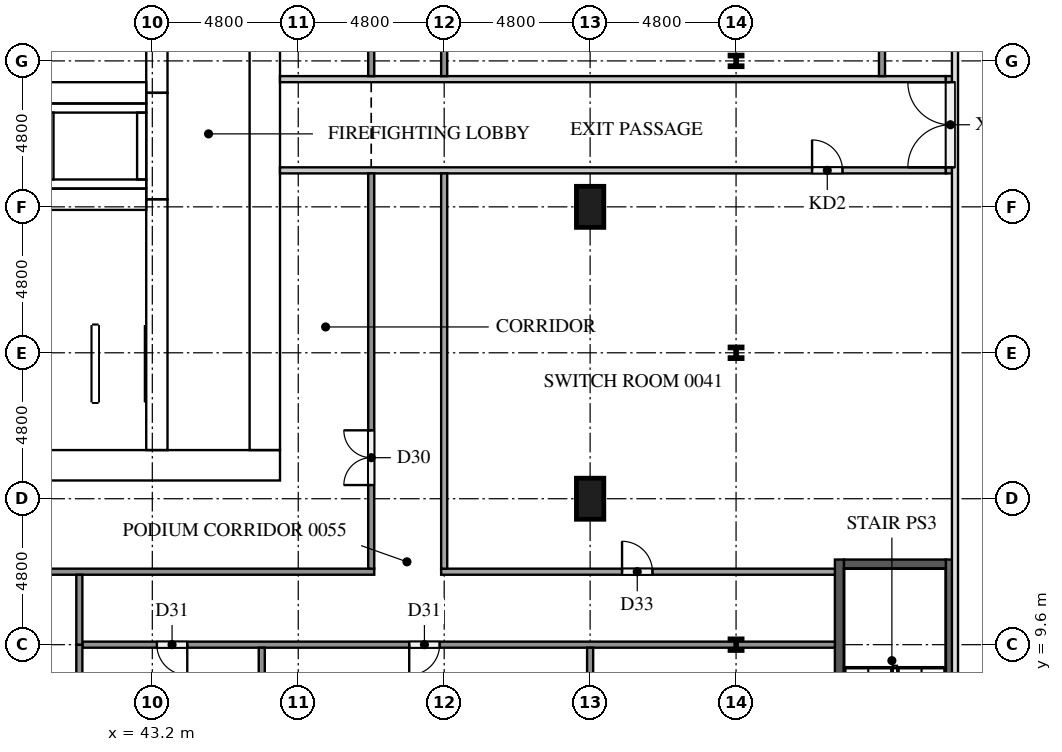
"""IFC4 building model, lengths in metres.
Left out: names, types, materials, properties, quantities, classifications, styles, units other than length and angle.
Written with IfcOpenShell. Run it as: python <this file> out.ifc"""

import sys

from ifc_helpers import new_model, si_unit, direction, frame, frame_2d, origin, origin_2d, place, context, subcontext, project, spatial, rectangle, i_section, extrude, element, fill, save


model = new_model("IFC4")
c1 = context("Model", 3, precision=1e-05, world=origin(), true_north=direction((0.0, 1.0)))
c2 = subcontext(c1, "Body", "Model", "MODEL_VIEW")
j1 = project(units=[si_unit("LENGTHUNIT", "METRE"), si_unit("PLANEANGLEUNIT", "RADIAN")], contexts=[c1])
p1 = place(None, origin())
s1 = spatial("IfcSite", under=j1, at=p1, CompositionType="ELEMENT")
p2 = place(p1, origin())
s2 = spatial("IfcBuilding", under=s1, at=p2, CompositionType="ELEMENT")
p3 = place(p2, origin())
s3 = spatial("IfcBuildingStorey", under=s2, at=p3, CompositionType="ELEMENT", Elevation=0.0)
p4 = place(p3, frame((65.8, 4.4, 0.0), z_axis=(0.0, 0.0, 1.0), x_axis=(0.0, 1.0, 0.0)))
e1 = element("IfcWall", 1, at=p4, inside=s3, PredefinedType="SOLIDWALL", context=c2, shape_type="SweptSolid", body=[
    extrude(rectangle(XDim=8.0, YDim=0.3, at=frame_2d((4.0, 0.0))), origin(), (0.0, 0.0, 1.0), 5.7),
])
p5 = place(p3, frame((69.45, 4.4, 0.0), z_axis=(0.0, 0.0, 1.0), x_axis=(0.0, 1.0, 0.0)))
e2 = element("IfcWall", 2, at=p5, inside=s3, PredefinedType="SOLIDWALL", context=c2, shape_type="SweptSolid", body=[
    extrude(rectangle(XDim=8.0, YDim=0.3, at=frame_2d((4.0, 0.0))), origin(), (0.0, 0.0, 1.0), 5.7),
])
p6 = place(p5, frame((0.4, 0.0, 0.0)))
e3 = element("IfcOpeningElement", 3, at=p6, cuts=e2, PredefinedType="OPENING", context=c2, shape_type="SweptSolid", body=[
    extrude(rectangle(XDim=1.4, YDim=2.1, at=frame_2d((0.7, 1.05))), frame((0.0, 0.16, 0.0), z_axis=(0.0, -1.0, 0.0), x_axis=(1.0, 0.0, 0.0)), (0.0, 0.0, 1.0), 0.32),
])
p7 = place(p3, frame((65.95, 12.25, 0.0), z_axis=(0.0, 0.0, 1.0), x_axis=(1.0, 0.0, 0.0)))
e4 = element("IfcWall", 4, at=p7, inside=s3, PredefinedType="SOLIDWALL", context=c2, shape_type="SweptSolid", body=[
    extrude(rectangle(XDim=3.35, YDim=0.3, at=frame_2d((1.675, 0.0))), origin(), (0.0, 0.0, 1.0), 5.7),
])
p8 = place(p3, frame((15.0, 15.5, 0.0), z_axis=(0.0, 0.0, 1.0), x_axis=(1.0, 0.0, 0.0)))
e5 = element("IfcWall", 5, at=p8, inside=s3, PredefinedType="SHEAR", context=c2, shape_type="SweptSolid", body=[
    extrude(rectangle(XDim=32.4, YDim=1.0, at=frame_2d((16.2, 0.0))), origin(), (0.0, 0.0, 1.0), 5.7),
])
p9 = place(p8, frame((15.3, 0.0, 0.0)))
e6 = element("IfcOpeningElement", 6, at=p9, cuts=e5, PredefinedType="OPENING", context=c2, shape_type="SweptSolid", body=[
    extrude(rectangle(XDim=1.8, YDim=2.1, at=frame_2d((0.9, 1.05))), frame((0.0, 0.51, 0.0), z_axis=(0.0, -1.0, 0.0), x_axis=(1.0, 0.0, 0.0)), (0.0, 0.0, 1.0), 1.02),
])
p10 = place(p3, frame((46.9, 16.0, 0.0), z_axis=(0.0, 0.0, 1.0), x_axis=(0.0, 1.0, 0.0)))
e7 = element("IfcWall", 7, at=p10, inside=s3, PredefinedType="SHEAR", context=c2, shape_type="SweptSolid", body=[
    extrude(rectangle(XDim=20.8, YDim=1.0, at=frame_2d((10.4, 0.0))), origin(), (0.0, 0.0, 1.0), 5.7),
])
p11 = place(p10, frame((10.1, 0.0, 0.0)))
e8 = element("IfcOpeningElement", 8, at=p11, cuts=e7, PredefinedType="OPENING", context=c2, shape_type="SweptSolid", body=[
    extrude(rectangle(XDim=1.2, YDim=2.1, at=frame_2d((0.6, 1.05))), frame((0.0, 0.51, 0.0), z_axis=(0.0, -1.0, 0.0), x_axis=(1.0, 0.0, 0.0)), (0.0, 0.0, 1.0), 1.02),
])
p12 = place(p3, frame((43.35, 16.0, 0.0), z_axis=(0.0, 0.0, 1.0), x_axis=(0.0, 1.0, 0.0)))
e9 = element("IfcWall", 9, at=p12, inside=s3, PredefinedType="SHEAR", context=c2, shape_type="SweptSolid", body=[
    extrude(rectangle(XDim=8.25, YDim=0.7, at=frame_2d((4.125, 0.0))), origin(), (0.0, 0.0, 1.0), 5.7),
])
p13 = place(p12, frame((0.2, 0.0, 0.0)))
e10 = element("IfcOpeningElement", 10, at=p13, cuts=e9, PredefinedType="OPENING", context=c2, shape_type="SweptSolid", body=[
    extrude(rectangle(XDim=1.2, YDim=2.1, at=frame_2d((0.6, 1.05))), frame((0.0, 0.36, 0.0), z_axis=(0.0, -1.0, 0.0), x_axis=(1.0, 0.0, 0.0)), (0.0, 0.0, 1.0), 0.72),
])
p14 = place(p3, frame((43.35, 24.25, 0.0), z_axis=(0.0, 0.0, 1.0), x_axis=(0.0, 1.0, 0.0)))
e11 = element("IfcWall", 11, at=p14, inside=s3, PredefinedType="SHEAR", context=c2, shape_type="SweptSolid", body=[
    extrude(rectangle(XDim=3.5, YDim=0.7, at=frame_2d((1.75, 0.0))), origin(), (0.0, 0.0, 1.0), 5.7),
])
p15 = place(p14, frame((1.2, 0.0, 0.0)))
e12 = element("IfcOpeningElement", 12, at=p15, cuts=e11, PredefinedType="OPENING", context=c2, shape_type="SweptSolid", body=[
    extrude(rectangle(XDim=1.1, YDim=2.1, at=frame_2d((0.55, 1.05))), frame((0.0, 0.36, 0.0), z_axis=(0.0, -1.0, 0.0), x_axis=(1.0, 0.0, 0.0)), (0.0, 0.0, 1.0), 0.72),
])
p16 = place(p3, frame((43.35, 27.75, 0.0), z_axis=(0.0, 0.0, 1.0), x_axis=(0.0, 1.0, 0.0)))
e13 = element("IfcWall", 13, at=p16, inside=s3, PredefinedType="SHEAR", context=c2, shape_type="SweptSolid", body=[
    extrude(rectangle(XDim=9.05, YDim=0.7, at=frame_2d((4.525, 0.0))), origin(), (0.0, 0.0, 1.0), 5.7),
])
p17 = place(p16, frame((7.65, 0.0, 0.0)))
e14 = element("IfcOpeningElement", 14, at=p17, cuts=e13, PredefinedType="OPENING", context=c2, shape_type="SweptSolid", body=[
    extrude(rectangle(XDim=1.2, YDim=2.1, at=frame_2d((0.6, 1.05))), frame((0.0, 0.36, 0.0), z_axis=(0.0, -1.0, 0.0), x_axis=(1.0, 0.0, 0.0)), (0.0, 0.0, 1.0), 0.72),
])
for number, where, z_axis, x_axis in (
    (15, (39.65, 24.25, 0.0), (0.0, 0.0, 1.0), (1.0, 0.0, 0.0)),
    (16, (39.65, 27.75, 0.0), (0.0, 0.0, 1.0), (1.0, 0.0, 0.0)),
):
    element("IfcWall", number, at=place(p3, frame(where, z_axis=z_axis, x_axis=x_axis)), inside=s3, PredefinedType="SHEAR", context=c2, shape_type="SweptSolid", body=[
        extrude(rectangle(XDim=3.35, YDim=0.7, at=frame_2d((1.675, 0.0))), origin(), (0.0, 0.0, 1.0), 5.7),
    ])
for number, where, z_axis, x_axis in (
    (17, (39.65, 24.75, -1.8), (0.0, 0.0, 1.0), (1.0, 0.0, 0.0)),
    (18, (39.65, 27.25, -1.8), (0.0, 0.0, 1.0), (1.0, 0.0, 0.0)),
):
    element("IfcWall", number, at=place(p3, frame(where, z_axis=z_axis, x_axis=x_axis)), inside=s3, PredefinedType="SOLIDWALL", context=c2, shape_type="SweptSolid", body=[
        extrude(rectangle(XDim=3.35, YDim=0.3, at=frame_2d((1.675, 0.0))), origin(), (0.0, 0.0, 1.0), 1.8),
    ])
for number, where, z_axis, x_axis in (
    (19, (39.8, 24.9, -1.8), (0.0, 0.0, 1.0), (0.0, 1.0, 0.0)),
    (20, (42.85, 24.9, -1.8), (0.0, 0.0, 1.0), (0.0, 1.0, 0.0)),
):
    element("IfcWall", number, at=place(p3, frame(where, z_axis=z_axis, x_axis=x_axis)), inside=s3, PredefinedType="SOLIDWALL", context=c2, shape_type="SweptSolid", body=[
        extrude(rectangle(XDim=2.2, YDim=0.3, at=frame_2d((1.1, 0.0))), origin(), (0.0, 0.0, 1.0), 1.8),
    ])
for number, where, z_axis, x_axis in (
    (21, (57.6, 14.4, 0.0), (0.0, 0.0, 1.0), (0.0, 1.0, 0.0)),
    (22, (57.6, 24.0, 0.0), (0.0, 0.0, 1.0), (0.0, 1.0, 0.0)),
):
    element("IfcColumn", number, at=place(p3, frame(where, z_axis=z_axis, x_axis=x_axis)), inside=s3, PredefinedType="COLUMN", context=c2, shape_type="SweptSolid", body=[
        extrude(rectangle(XDim=1.35, YDim=0.9, at=origin_2d()), origin(), (0.0, 0.0, 1.0), 5.7),
    ])
for number, where, z_axis, x_axis in (
    (23, (62.4, 9.6, 0.0), (0.0, 0.0, 1.0), (1.0, 0.0, 0.0)),
    (24, (62.4, 19.2, 0.0), (0.0, 0.0, 1.0), (1.0, 0.0, 0.0)),
    (25, (62.4, 28.8, 0.0), (0.0, 0.0, 1.0), (1.0, 0.0, 0.0)),
):
    element("IfcColumn", number, at=place(p3, frame(where, z_axis=z_axis, x_axis=x_axis)), inside=s3, PredefinedType="COLUMN", context=c2, shape_type="SweptSolid", body=[
        extrude(i_section(OverallWidth=0.396, OverallDepth=0.381, WebThickness=0.019, FlangeThickness=0.03, at=origin_2d()), origin(), (0.0, 0.0, 1.0), 5.7),
    ])
p18 = place(p3, frame((47.4, 25.2, 0.0), z_axis=(0.0, 0.0, 1.0), x_axis=(1.0, 0.0, 0.0)))
e26 = element("IfcWall", 26, at=p18, inside=s3, PredefinedType="PARTITIONING", context=c2, shape_type="SweptSolid", body=[
    extrude(rectangle(XDim=21.9, YDim=0.2, at=frame_2d((10.95, 0.0))), origin(), (0.0, 0.0, 1.0), 5.7),
])
p19 = place(p18, frame((17.5, 0.0, 0.0)))
e27 = element("IfcOpeningElement", 27, at=p19, cuts=e26, PredefinedType="OPENING", context=c2, shape_type="SweptSolid", body=[
    extrude(rectangle(XDim=1.0, YDim=2.1, at=frame_2d((0.5, 1.05))), frame((0.0, 0.11, 0.0), z_axis=(0.0, -1.0, 0.0), x_axis=(1.0, 0.0, 0.0)), (0.0, 0.0, 1.0), 0.22),
])
p20 = place(p3, frame((47.4, 28.2, 0.0), z_axis=(0.0, 0.0, 1.0), x_axis=(1.0, 0.0, 0.0)))
e28 = element("IfcWall", 28, at=p20, inside=s3, PredefinedType="PARTITIONING", context=c2, shape_type="SweptSolid", body=[
    extrude(rectangle(XDim=21.9, YDim=0.2, at=frame_2d((10.95, 0.0))), origin(), (0.0, 0.0, 1.0), 5.7),
])
p21 = place(p3, frame((69.45, 25.1, 0.0), z_axis=(0.0, 0.0, 1.0), x_axis=(0.0, 1.0, 0.0)))
e29 = element("IfcWall", 29, at=p21, inside=s3, PredefinedType="SOLIDWALL", context=c2, shape_type="SweptSolid", body=[
    extrude(rectangle(XDim=3.2, YDim=0.3, at=frame_2d((1.6, 0.0))), origin(), (0.0, 0.0, 1.0), 5.7),
])
p22 = place(p21, frame((0.2, 0.0, 0.0)))
e30 = element("IfcOpeningElement", 30, at=p22, cuts=e29, PredefinedType="OPENING", context=c2, shape_type="SweptSolid", body=[
    extrude(rectangle(XDim=2.8, YDim=2.1, at=frame_2d((1.4, 1.05))), frame((0.0, 0.16, 0.0), z_axis=(0.0, -1.0, 0.0), x_axis=(1.0, 0.0, 0.0)), (0.0, 0.0, 1.0), 0.32),
])
p23 = place(p3, frame((65.65, 9.6, 0.0), z_axis=(0.0, 0.0, 1.0), x_axis=(-1.0, 0.0, 0.0)))
e31 = element("IfcWall", 31, at=p23, inside=s3, PredefinedType="PARTITIONING", context=c2, shape_type="SweptSolid", body=[
    extrude(rectangle(XDim=24.75, YDim=0.2, at=frame_2d((12.375, 0.0))), origin(), (0.0, 0.0, 1.0), 5.7),
])
p24 = place(p23, frame((21.3, 0.0, 0.0)))
e32 = element("IfcOpeningElement", 32, at=p24, cuts=e31, PredefinedType="OPENING", context=c2, shape_type="SweptSolid", body=[
    extrude(rectangle(XDim=1.0, YDim=2.1, at=frame_2d((0.5, 1.05))), frame((0.0, 0.11, 0.0), z_axis=(0.0, -1.0, 0.0), x_axis=(1.0, 0.0, 0.0)), (0.0, 0.0, 1.0), 0.22),
])
p25 = place(p23, frame((13.0, 0.0, 0.0)))
e33 = element("IfcOpeningElement", 33, at=p25, cuts=e31, PredefinedType="OPENING", context=c2, shape_type="SweptSolid", body=[
    extrude(rectangle(XDim=1.0, YDim=2.1, at=frame_2d((0.5, 1.05))), frame((0.0, 0.11, 0.0), z_axis=(0.0, -1.0, 0.0), x_axis=(1.0, 0.0, 0.0)), (0.0, 0.0, 1.0), 0.22),
])
p26 = place(p3, frame((11.9, 12.0, 0.0), z_axis=(0.0, 0.0, 1.0), x_axis=(1.0, 0.0, 0.0)))
e34 = element("IfcWall", 34, at=p26, inside=s3, PredefinedType="PARTITIONING", context=c2, shape_type="SweptSolid", body=[
    extrude(rectangle(XDim=38.6, YDim=0.2, at=frame_2d((19.3, 0.0))), origin(), (0.0, 0.0, 1.0), 5.7),
])
p27 = place(p26, frame((1.85, 0.0, 0.0)))
e35 = element("IfcOpeningElement", 35, at=p27, cuts=e34, PredefinedType="OPENING", context=c2, shape_type="SweptSolid", body=[
    extrude(rectangle(XDim=1.8, YDim=2.1, at=frame_2d((0.9, 1.05))), frame((0.0, 0.11, 0.0), z_axis=(0.0, -1.0, 0.0), x_axis=(1.0, 0.0, 0.0)), (0.0, 0.0, 1.0), 0.22),
])
p28 = place(p26, frame((23.25, 0.0, 0.0)))
e36 = element("IfcOpeningElement", 36, at=p28, cuts=e34, PredefinedType="OPENING", context=c2, shape_type="SweptSolid", body=[
    extrude(rectangle(XDim=1.8, YDim=2.1, at=frame_2d((0.9, 1.05))), frame((0.0, 0.11, 0.0), z_axis=(0.0, -1.0, 0.0), x_axis=(1.0, 0.0, 0.0)), (0.0, 0.0, 1.0), 0.22),
])
p29 = place(p26, frame((13.65, 0.0, 0.0)))
e37 = element("IfcOpeningElement", 37, at=p29, cuts=e34, PredefinedType="OPENING", context=c2, shape_type="SweptSolid", body=[
    extrude(rectangle(XDim=1.8, YDim=2.1, at=frame_2d((0.9, 1.05))), frame((0.0, 0.11, 0.0), z_axis=(0.0, -1.0, 0.0), x_axis=(1.0, 0.0, 0.0)), (0.0, 0.0, 1.0), 0.22),
])
p30 = place(p26, frame((4.05, 0.0, 0.0)))
e38 = element("IfcOpeningElement", 38, at=p30, cuts=e34, PredefinedType="OPENING", context=c2, shape_type="SweptSolid", body=[
    extrude(rectangle(XDim=1.8, YDim=2.1, at=frame_2d((0.9, 1.05))), frame((0.0, 0.11, 0.0), z_axis=(0.0, -1.0, 0.0), x_axis=(1.0, 0.0, 0.0)), (0.0, 0.0, 1.0), 0.22),
])
p31 = place(p3, frame((52.7, 12.0, 0.0), z_axis=(0.0, 0.0, 1.0), x_axis=(1.0, 0.0, 0.0)))
e39 = element("IfcWall", 39, at=p31, inside=s3, PredefinedType="PARTITIONING", context=c2, shape_type="SweptSolid", body=[
    extrude(rectangle(XDim=12.95, YDim=0.2, at=frame_2d((6.475, 0.0))), origin(), (0.0, 0.0, 1.0), 5.7),
])
p32 = place(p31, frame((5.95, 0.0, 0.0)))
e40 = element("IfcOpeningElement", 40, at=p32, cuts=e39, PredefinedType="OPENING", context=c2, shape_type="SweptSolid", body=[
    extrude(rectangle(XDim=1.0, YDim=2.1, at=frame_2d((0.5, 1.05))), frame((0.0, 0.11, 0.0), z_axis=(0.0, -1.0, 0.0), x_axis=(1.0, 0.0, 0.0)), (0.0, 0.0, 1.0), 0.22),
])
p33 = place(p3, frame((40.8, 0.0, 0.0), z_axis=(0.0, 0.0, 1.0), x_axis=(0.0, 1.0, 0.0)))
e41 = element("IfcWall", 41, at=p33, inside=s3, PredefinedType="PARTITIONING", context=c2, shape_type="SweptSolid", body=[
    extrude(rectangle(XDim=9.6, YDim=0.2, at=frame_2d((4.8, 0.0))), origin(), (0.0, 0.0, 1.0), 5.7),
])
p34 = place(p3, frame((40.8, 9.6, 0.0), z_axis=(0.0, 0.0, 1.0), x_axis=(0.0, 1.0, 0.0)))
e42 = element("IfcWall", 42, at=p34, inside=s3, PredefinedType="PARTITIONING", context=c2, shape_type="SweptSolid", body=[
    extrude(rectangle(XDim=2.3, YDim=0.2, at=frame_2d((1.15, 0.0))), origin(), (0.0, 0.0, 1.0), 5.7),
])
p35 = place(p3, frame((46.8, 0.1, 0.0), z_axis=(0.0, 0.0, 1.0), x_axis=(0.0, 1.0, 0.0)))
e43 = element("IfcWall", 43, at=p35, inside=s3, PredefinedType="PARTITIONING", context=c2, shape_type="SweptSolid", body=[
    extrude(rectangle(XDim=9.4, YDim=0.2, at=frame_2d((4.7, 0.0))), origin(), (0.0, 0.0, 1.0), 5.7),
])
p36 = place(p3, frame((50.4, 12.1, 0.0), z_axis=(0.0, 0.0, 1.0), x_axis=(0.0, 1.0, 0.0)))
e44 = element("IfcWall", 44, at=p36, inside=s3, PredefinedType="PARTITIONING", context=c2, shape_type="SweptSolid", body=[
    extrude(rectangle(XDim=13.0, YDim=0.2, at=frame_2d((6.5, 0.0))), origin(), (0.0, 0.0, 1.0), 5.7),
])
p37 = place(p36, frame((2.75, 0.0, 0.0)))
e45 = element("IfcOpeningElement", 45, at=p37, cuts=e44, PredefinedType="OPENING", context=c2, shape_type="SweptSolid", body=[
    extrude(rectangle(XDim=1.8, YDim=2.1, at=frame_2d((0.9, 1.05))), frame((0.0, 0.11, 0.0), z_axis=(0.0, -1.0, 0.0), x_axis=(1.0, 0.0, 0.0)), (0.0, 0.0, 1.0), 0.22),
])
p38 = place(p3, frame((50.4, 28.3, 0.0), z_axis=(0.0, 0.0, 1.0), x_axis=(0.0, 1.0, 0.0)))
e46 = element("IfcWall", 46, at=p38, inside=s3, PredefinedType="PARTITIONING", context=c2, shape_type="SweptSolid", body=[
    extrude(rectangle(XDim=12.4, YDim=0.2, at=frame_2d((6.2, 0.0))), origin(), (0.0, 0.0, 1.0), 5.7),
])
p39 = place(p38, frame((3.85, 0.0, 0.0)))
e47 = element("IfcOpeningElement", 47, at=p39, cuts=e46, PredefinedType="OPENING", context=c2, shape_type="SweptSolid", body=[
    extrude(rectangle(XDim=1.8, YDim=2.1, at=frame_2d((0.9, 1.05))), frame((0.0, 0.11, 0.0), z_axis=(0.0, -1.0, 0.0), x_axis=(1.0, 0.0, 0.0)), (0.0, 0.0, 1.0), 0.22),
])
p40 = place(p3, frame((52.8, 28.3, 0.0), z_axis=(0.0, 0.0, 1.0), x_axis=(0.0, 1.0, 0.0)))
e48 = element("IfcWall", 48, at=p40, inside=s3, PredefinedType="PARTITIONING", context=c2, shape_type="SweptSolid", body=[
    extrude(rectangle(XDim=12.4, YDim=0.2, at=frame_2d((6.2, 0.0))), origin(), (0.0, 0.0, 1.0), 5.7),
])
p41 = place(p3, frame((52.8, 12.1, 0.0), z_axis=(0.0, 0.0, 1.0), x_axis=(0.0, 1.0, 0.0)))
e49 = element("IfcWall", 49, at=p41, inside=s3, PredefinedType="PARTITIONING", context=c2, shape_type="SweptSolid", body=[
    extrude(rectangle(XDim=13.0, YDim=0.2, at=frame_2d((6.5, 0.0))), origin(), (0.0, 0.0, 1.0), 5.7),
])
p42 = place(p3, frame((57.6, 0.1, 0.0), z_axis=(0.0, 0.0, 1.0), x_axis=(0.0, 1.0, 0.0)))
e50 = element("IfcWall", 50, at=p42, inside=s3, PredefinedType="PARTITIONING", context=c2, shape_type="SweptSolid", body=[
    extrude(rectangle(XDim=9.4, YDim=0.2, at=frame_2d((4.7, 0.0))), origin(), (0.0, 0.0, 1.0), 5.7),
])
p43 = place(p3, frame((67.2, 28.3, 0.0), z_axis=(0.0, 0.0, 1.0), x_axis=(0.0, 1.0, 0.0)))
e51 = element("IfcWall", 51, at=p43, inside=s3, PredefinedType="PARTITIONING", context=c2, shape_type="SweptSolid", body=[
    extrude(rectangle(XDim=12.4, YDim=0.2, at=frame_2d((6.2, 0.0))), origin(), (0.0, 0.0, 1.0), 5.7),
])
p44 = place(p15, origin())
e52 = element("IfcDoor", 52, at=p44, inside=s3, OperationType="DOUBLE_DOOR_SLIDING", PredefinedType="DOOR", context=c2, shape_type="SweptSolid", body=[
    extrude(rectangle(XDim=1.1, YDim=2.1, at=frame_2d((0.55, 1.05))), frame((0.0, 0.025, 0.0), z_axis=(0.0, -1.0, 0.0), x_axis=(1.0, 0.0, 0.0)), (0.0, 0.0, 1.0), 0.05),
])
fill(e12, e52)
p45 = place(p13, frame((1.2, 0.0, 0.0), z_axis=(0.0, 0.0, 1.0), x_axis=(-1.0, 0.0, 0.0)))
e53 = element("IfcDoor", 53, at=p45, inside=s3, OperationType="SINGLE_SWING_LEFT", PredefinedType="DOOR", context=c2, shape_type="SweptSolid", body=[
    extrude(rectangle(XDim=1.2, YDim=2.1, at=frame_2d((0.6, 1.05))), frame((0.0, 0.025, 0.0), z_axis=(0.0, -1.0, 0.0), x_axis=(1.0, 0.0, 0.0)), (0.0, 0.0, 1.0), 0.05),
])
fill(e10, e53)
p46 = place(p11, frame((1.2, 0.0, 0.0), z_axis=(0.0, 0.0, 1.0), x_axis=(-1.0, 0.0, 0.0)))
e54 = element("IfcDoor", 54, at=p46, inside=s3, OperationType="SINGLE_SWING_RIGHT", PredefinedType="DOOR", context=c2, shape_type="SweptSolid", body=[
    extrude(rectangle(XDim=1.2, YDim=2.1, at=frame_2d((0.6, 1.05))), frame((0.0, 0.025, 0.0), z_axis=(0.0, -1.0, 0.0), x_axis=(1.0, 0.0, 0.0)), (0.0, 0.0, 1.0), 0.05),
])
fill(e8, e54)
p47 = place(p19, origin())
e55 = element("IfcDoor", 55, at=p47, inside=s3, OperationType="SINGLE_SWING_LEFT", PredefinedType="DOOR", context=c2, shape_type="SweptSolid", body=[
    extrude(rectangle(XDim=1.0, YDim=2.1, at=frame_2d((0.5, 1.05))), frame((0.0, 0.025, 0.0), z_axis=(0.0, -1.0, 0.0), x_axis=(1.0, 0.0, 0.0)), (0.0, 0.0, 1.0), 0.05),
])
fill(e27, e55)
p48 = place(p22, frame((2.8, 0.0, 0.0), z_axis=(0.0, 0.0, 1.0), x_axis=(-1.0, 0.0, 0.0)))
e56 = element("IfcDoor", 56, at=p48, inside=s3, OperationType="DOUBLE_DOOR_SINGLE_SWING", PredefinedType="DOOR", context=c2, shape_type="SweptSolid", body=[
    extrude(rectangle(XDim=2.8, YDim=2.1, at=frame_2d((1.4, 1.05))), frame((0.0, 0.025, 0.0), z_axis=(0.0, -1.0, 0.0), x_axis=(1.0, 0.0, 0.0)), (0.0, 0.0, 1.0), 0.05),
])
fill(e30, e56)
p49 = place(p37, origin())
e57 = element("IfcDoor", 57, at=p49, inside=s3, OperationType="DOUBLE_DOOR_SINGLE_SWING", PredefinedType="DOOR", context=c2, shape_type="SweptSolid", body=[
    extrude(rectangle(XDim=1.8, YDim=2.1, at=frame_2d((0.9, 1.05))), frame((0.0, 0.025, 0.0), z_axis=(0.0, -1.0, 0.0), x_axis=(1.0, 0.0, 0.0)), (0.0, 0.0, 1.0), 0.05),
])
fill(e45, e57)
p50 = place(p24, origin())
e58 = element("IfcDoor", 58, at=p50, inside=s3, OperationType="SINGLE_SWING_LEFT", PredefinedType="DOOR", context=c2, shape_type="SweptSolid", body=[
    extrude(rectangle(XDim=1.0, YDim=2.1, at=frame_2d((0.5, 1.05))), frame((0.0, 0.025, 0.0), z_axis=(0.0, -1.0, 0.0), x_axis=(1.0, 0.0, 0.0)), (0.0, 0.0, 1.0), 0.05),
])
fill(e32, e58)
p51 = place(p25, origin())
e59 = element("IfcDoor", 59, at=p51, inside=s3, OperationType="SINGLE_SWING_RIGHT", PredefinedType="DOOR", context=c2, shape_type="SweptSolid", body=[
    extrude(rectangle(XDim=1.0, YDim=2.1, at=frame_2d((0.5, 1.05))), frame((0.0, 0.025, 0.0), z_axis=(0.0, -1.0, 0.0), x_axis=(1.0, 0.0, 0.0)), (0.0, 0.0, 1.0), 0.05),
])
fill(e33, e59)
p52 = place(p32, origin())
e60 = element("IfcDoor", 60, at=p52, inside=s3, OperationType="SINGLE_SWING_LEFT", PredefinedType="DOOR", context=c2, shape_type="SweptSolid", body=[
    extrude(rectangle(XDim=1.0, YDim=2.1, at=frame_2d((0.5, 1.05))), frame((0.0, 0.025, 0.0), z_axis=(0.0, -1.0, 0.0), x_axis=(1.0, 0.0, 0.0)), (0.0, 0.0, 1.0), 0.05),
])
fill(e40, e60)
save(model, sys.argv[1])
